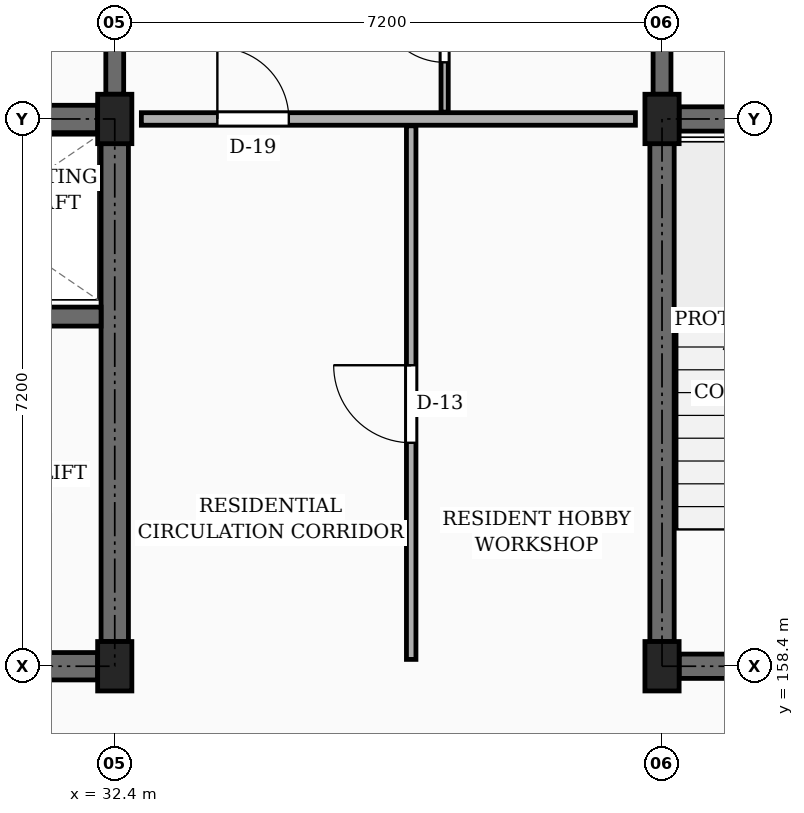
"""IFC4 building model, lengths in metres.
Left out: names, types, materials, properties, quantities, classifications, styles, units other than length and angle.
Written with IfcOpenShell. Run it as: python <this file> out.ifc"""

import sys

from ifc_helpers import new_model, si_unit, direction, frame, frame_2d, origin, origin_2d, place, context, subcontext, project, spatial, rectangle, extrude, element, fill, save


model = new_model("IFC4")
c1 = context("Model", 3, precision=1e-05, world=origin(), true_north=direction((0.0, 1.0)))
c2 = subcontext(c1, "Body", "Model", "MODEL_VIEW")
j1 = project(units=[si_unit("LENGTHUNIT", "METRE"), si_unit("PLANEANGLEUNIT", "RADIAN")], contexts=[c1])
p1 = place(None, origin())
s1 = spatial("IfcSite", under=j1, at=p1, CompositionType="ELEMENT")
p2 = place(p1, origin())
s2 = spatial("IfcBuilding", under=s1, at=p2, CompositionType="ELEMENT")
p3 = place(p2, frame((0.0, 0.0, 13.95)))
s3 = spatial("IfcBuildingStorey", under=s2, at=p3, CompositionType="ELEMENT", Elevation=13.95)
for number, where, z_axis, x_axis in (
    (1, (32.4, 158.4, 0.0), (0.0, 0.0, 1.0), (1.0, 0.0, 0.0)),
    (2, (32.4, 165.6, 0.0), (0.0, 0.0, 1.0), (1.0, 0.0, 0.0)),
    (3, (39.6, 158.4, 0.0), (0.0, 0.0, 1.0), (1.0, 0.0, 0.0)),
    (4, (39.6, 165.6, 0.0), (0.0, 0.0, 1.0), (1.0, 0.0, 0.0)),
):
    element("IfcColumn", number, at=place(p3, frame(where, z_axis=z_axis, x_axis=x_axis)), inside=s3, PredefinedType="COLUMN", context=c2, shape_type="SweptSolid", body=[
        extrude(rectangle(XDim=0.45, YDim=0.65, at=origin_2d()), origin(), (0.0, 0.0, 1.0), 3.15),
    ])
p4 = place(p3, frame((32.4, 165.925, 0.0), z_axis=(0.0, 0.0, 1.0), x_axis=(0.0, 1.0, 0.0)))
e5 = element("IfcWall", 5, at=p4, inside=s3, PredefinedType="SOLIDWALL", context=c2, shape_type="SweptSolid", body=[
    extrude(rectangle(XDim=6.6, YDim=0.235, at=frame_2d((3.3, 0.0))), origin(), (0.0, 0.0, 1.0), 2.185),
])
p5 = place(p3, frame((39.6, 165.925, 0.0), z_axis=(0.0, 0.0, 1.0), x_axis=(0.0, 1.0, 0.0)))
e6 = element("IfcWall", 6, at=p5, inside=s3, PredefinedType="SOLIDWALL", context=c2, shape_type="SweptSolid", body=[
    extrude(rectangle(XDim=6.6, YDim=0.235, at=frame_2d((3.3, 0.0))), origin(), (0.0, 0.0, 1.0), 2.185),
])
p6 = place(p5, frame((4.15, 0.0, 0.0)))
e7 = element("IfcOpeningElement", 7, at=p6, cuts=e6, PredefinedType="OPENING", context=c2, shape_type="SweptSolid", body=[
    extrude(rectangle(XDim=0.98, YDim=2.12, at=frame_2d((0.49, 1.06))), frame((0.0, 0.127, 0.0), z_axis=(0.0, -1.0, 0.0), x_axis=(1.0, 0.0, 0.0)), (0.0, 0.0, 1.0), 0.255),
])
p7 = place(p3, frame((25.425, 165.6, 0.0), z_axis=(0.0, 0.0, 1.0), x_axis=(1.0, 0.0, 0.0)))
e8 = element("IfcWall", 8, at=p7, inside=s3, PredefinedType="SHEAR", context=c2, shape_type="SweptSolid", body=[
    extrude(rectangle(XDim=6.75, YDim=0.36, at=frame_2d((3.375, 0.0))), origin(), (0.0, 0.0, 1.0), 2.885),
])
p8 = place(p3, frame((32.4, 158.725, 0.0), z_axis=(0.0, 0.0, 1.0), x_axis=(0.0, 1.0, 0.0)))
e9 = element("IfcWall", 9, at=p8, inside=s3, PredefinedType="SHEAR", context=c2, shape_type="SweptSolid", body=[
    extrude(rectangle(XDim=6.55, YDim=0.36, at=frame_2d((3.275, 0.0))), origin(), (0.0, 0.0, 1.0), 2.885),
])
p9 = place(p3, frame((25.425, 158.4, 0.0), z_axis=(0.0, 0.0, 1.0), x_axis=(1.0, 0.0, 0.0)))
e10 = element("IfcWall", 10, at=p9, inside=s3, PredefinedType="SHEAR", context=c2, shape_type="SweptSolid", body=[
    extrude(rectangle(XDim=6.75, YDim=0.36, at=frame_2d((3.375, 0.0))), origin(), (0.0, 0.0, 1.0), 2.885),
])
p10 = place(p9, frame((4.525, 0.0, 0.0)))
e11 = element("IfcOpeningElement", 11, at=p10, cuts=e10, PredefinedType="OPENING", context=c2, shape_type="SweptSolid", body=[
    extrude(rectangle(XDim=1.1, YDim=2.15, at=frame_2d((0.55, 1.075))), frame((0.0, 0.19, 0.0), z_axis=(0.0, -1.0, 0.0), x_axis=(1.0, 0.0, 0.0)), (0.0, 0.0, 1.0), 0.38),
])
p11 = place(p3, frame((28.925, 163.0, 0.0), z_axis=(0.0, 0.0, 1.0), x_axis=(1.0, 0.0, 0.0)))
e12 = element("IfcWall", 12, at=p11, inside=s3, PredefinedType="SHEAR", context=c2, shape_type="SweptSolid", body=[
    extrude(rectangle(XDim=3.295, YDim=0.25, at=frame_2d((1.647, 0.0))), origin(), (0.0, 0.0, 1.0), 2.885),
])
p12 = place(p11, frame((1.1, 0.0, 0.0)))
e13 = element("IfcOpeningElement", 13, at=p12, cuts=e12, PredefinedType="OPENING", context=c2, shape_type="SweptSolid", body=[
    extrude(rectangle(XDim=1.1, YDim=2.2, at=frame_2d((0.55, 1.1))), frame((0.0, 0.135, 0.0), z_axis=(0.0, -1.0, 0.0), x_axis=(1.0, 0.0, 0.0)), (0.0, 0.0, 1.0), 0.27),
])
p13 = place(p3, frame((39.6, 158.725, 0.0), z_axis=(0.0, 0.0, 1.0), x_axis=(0.0, 1.0, 0.0)))
e14 = element("IfcWall", 14, at=p13, inside=s3, PredefinedType="SHEAR", context=c2, shape_type="SweptSolid", body=[
    extrude(rectangle(XDim=6.55, YDim=0.32, at=frame_2d((3.275, 0.0))), origin(), (0.0, 0.0, 1.0), 2.885),
])
p14 = place(p3, frame((39.825, 165.6, 0.0), z_axis=(0.0, 0.0, 1.0), x_axis=(1.0, 0.0, 0.0)))
e15 = element("IfcWall", 15, at=p14, inside=s3, PredefinedType="SHEAR", context=c2, shape_type="SweptSolid", body=[
    extrude(rectangle(XDim=6.75, YDim=0.32, at=frame_2d((3.375, 0.0))), origin(), (0.0, 0.0, 1.0), 2.885),
])
p15 = place(p3, frame((39.825, 158.4, 0.0), z_axis=(0.0, 0.0, 1.0), x_axis=(1.0, 0.0, 0.0)))
e16 = element("IfcWall", 16, at=p15, inside=s3, PredefinedType="SHEAR", context=c2, shape_type="SweptSolid", body=[
    extrude(rectangle(XDim=6.75, YDim=0.32, at=frame_2d((3.375, 0.0))), origin(), (0.0, 0.0, 1.0), 2.885),
])
p16 = place(p15, frame((4.525, 0.0, 0.0)))
e17 = element("IfcOpeningElement", 17, at=p16, cuts=e16, PredefinedType="OPENING", context=c2, shape_type="SweptSolid", body=[
    extrude(rectangle(XDim=1.1, YDim=2.15, at=frame_2d((0.55, 1.075))), frame((0.0, 0.17, 0.0), z_axis=(0.0, -1.0, 0.0), x_axis=(1.0, 0.0, 0.0)), (0.0, 0.0, 1.0), 0.34),
])
p17 = place(p3, frame((32.75, 165.6, 0.0), z_axis=(0.0, 0.0, 1.0), x_axis=(1.0, 0.0, 0.0)))
e18 = element("IfcWall", 18, at=p17, inside=s3, PredefinedType="PARTITIONING", context=c2, shape_type="SweptSolid", body=[
    extrude(rectangle(XDim=6.5, YDim=0.165, at=frame_2d((3.25, 0.0))), origin(), (0.0, 0.0, 1.0), 2.235),
])
p18 = place(p17, frame((1.0, 0.0, 0.0)))
e19 = element("IfcOpeningElement", 19, at=p18, cuts=e18, PredefinedType="OPENING", context=c2, shape_type="SweptSolid", body=[
    extrude(rectangle(XDim=0.94, YDim=2.12, at=frame_2d((0.47, 1.06))), frame((0.0, 0.093, 0.0), z_axis=(0.0, -1.0, 0.0), x_axis=(1.0, 0.0, 0.0)), (0.0, 0.0, 1.0), 0.185),
])
p19 = place(p3, frame((36.3, 158.49, 0.0), z_axis=(0.0, 0.0, 1.0), x_axis=(0.0, 1.0, 0.0)))
e20 = element("IfcWall", 20, at=p19, inside=s3, PredefinedType="PARTITIONING", context=c2, shape_type="SweptSolid", body=[
    extrude(rectangle(XDim=7.02, YDim=0.125, at=frame_2d((3.51, 0.0))), origin(), (0.0, 0.0, 1.0), 2.32),
])
p20 = place(p19, frame((2.85, 0.0, 0.0)))
e21 = element("IfcOpeningElement", 21, at=p20, cuts=e20, PredefinedType="OPENING", context=c2, shape_type="SweptSolid", body=[
    extrude(rectangle(XDim=1.02, YDim=2.15, at=frame_2d((0.51, 1.075))), frame((0.0, 0.073, 0.0), z_axis=(0.0, -1.0, 0.0), x_axis=(1.0, 0.0, 0.0)), (0.0, 0.0, 1.0), 0.145),
])
p21 = place(p3, frame((36.74, 165.69, 0.0), z_axis=(0.0, 0.0, 1.0), x_axis=(0.0, 1.0, 0.0)))
e22 = element("IfcWall", 22, at=p21, inside=s3, PredefinedType="PARTITIONING", context=c2, shape_type="SweptSolid", body=[
    extrude(rectangle(XDim=2.18, YDim=0.095, at=frame_2d((1.09, 0.0))), origin(), (0.0, 0.0, 1.0), 2.32),
])
p22 = place(p21, frame((0.655, 0.0, 0.0)))
e23 = element("IfcOpeningElement", 23, at=p22, cuts=e22, PredefinedType="OPENING", context=c2, shape_type="SweptSolid", body=[
    extrude(rectangle(XDim=0.87, YDim=2.05, at=frame_2d((0.435, 1.025))), frame((0.0, 0.058, 0.0), z_axis=(0.0, -1.0, 0.0), x_axis=(1.0, 0.0, 0.0)), (0.0, 0.0, 1.0), 0.115),
])
p23 = place(p18, origin())
e24 = element("IfcDoor", 24, at=p23, inside=s3, OperationType="SINGLE_SWING_LEFT", PredefinedType="DOOR", context=c2, shape_type="SweptSolid", body=[
    extrude(rectangle(XDim=0.94, YDim=2.12, at=frame_2d((0.47, 1.06))), frame((0.0, 0.025, 0.0), z_axis=(0.0, -1.0, 0.0), x_axis=(1.0, 0.0, 0.0)), (0.0, 0.0, 1.0), 0.05),
])
fill(e19, e24)
p24 = place(p20, origin())
e25 = element("IfcDoor", 25, at=p24, inside=s3, OperationType="SINGLE_SWING_RIGHT", PredefinedType="DOOR", context=c2, shape_type="SweptSolid", body=[
    extrude(rectangle(XDim=1.02, YDim=2.15, at=frame_2d((0.51, 1.075))), frame((0.0, 0.025, 0.0), z_axis=(0.0, -1.0, 0.0), x_axis=(1.0, 0.0, 0.0)), (0.0, 0.0, 1.0), 0.05),
])
fill(e21, e25)
p25 = place(p22, origin())
e26 = element("IfcDoor", 26, at=p25, inside=s3, OperationType="SINGLE_SWING_RIGHT", PredefinedType="DOOR", context=c2, shape_type="SweptSolid", body=[
    extrude(rectangle(XDim=0.87, YDim=2.05, at=frame_2d((0.435, 1.025))), frame((0.0, 0.025, 0.0), z_axis=(0.0, -1.0, 0.0), x_axis=(1.0, 0.0, 0.0)), (0.0, 0.0, 1.0), 0.05),
])
fill(e23, e26)
save(model, sys.argv[1])
